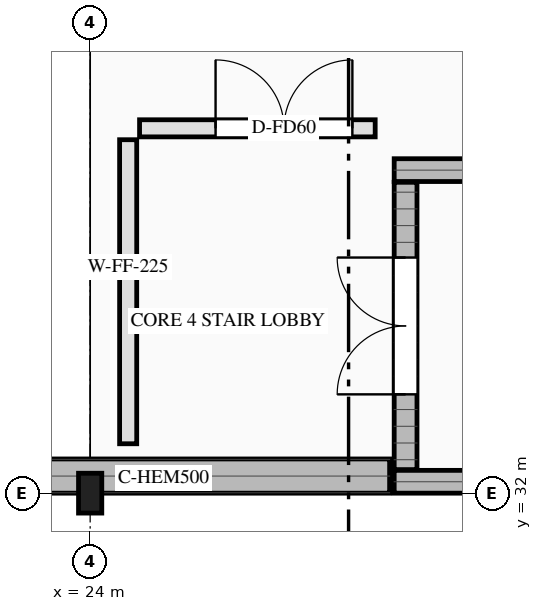
"""IFC4 building model, lengths in metres.
Left out: names, types, materials, properties, quantities, classifications, styles, units other than length and angle.
Written with IfcOpenShell. Run it as: python <this file> out.ifc"""

import sys

from ifc_helpers import new_model, si_unit, direction, frame, frame_2d, origin, origin_2d, place, context, subcontext, project, spatial, rectangle, i_section, extrude, element, fill, save


model = new_model("IFC4")
c1 = context("Model", 3, precision=1e-05, world=origin(), true_north=direction((0.0, 1.0)))
c2 = subcontext(c1, "Body", "Model", "MODEL_VIEW")
j1 = project(units=[si_unit("LENGTHUNIT", "METRE"), si_unit("PLANEANGLEUNIT", "RADIAN")], contexts=[c1])
p1 = place(None, origin())
s1 = spatial("IfcSite", under=j1, at=p1, CompositionType="ELEMENT")
p2 = place(p1, origin())
s2 = spatial("IfcBuilding", under=s1, at=p2, CompositionType="ELEMENT")
p3 = place(p2, frame((0.0, 0.0, -5.4)))
s3 = spatial("IfcBuildingStorey", under=s2, at=p3, CompositionType="ELEMENT", Elevation=-5.4)
p4 = place(p3, frame((16.225, 32.225, -0.4), z_axis=(0.0, 0.0, 1.0), x_axis=(1.0, 0.0, 0.0)))
e1 = element("IfcWall", 1, at=p4, inside=s3, PredefinedType="USERDEFINED", context=c2, shape_type="SweptSolid", body=[
    extrude(rectangle(XDim=11.715, YDim=0.45, at=frame_2d((5.857, 0.0))), origin(), (0.0, 0.0, 1.0), 5.5),
])
for number, where, z_axis, x_axis in (
    (2, (28.0, 32.15, -0.4), (0.0, 0.0, 1.0), (1.0, 0.0, 0.0)),
    (3, (28.0, 36.25, -0.4), (0.0, 0.0, 1.0), (1.0, 0.0, 0.0)),
):
    element("IfcWall", number, at=place(p3, frame(where, z_axis=z_axis, x_axis=x_axis)), inside=s3, PredefinedType="SHEAR", context=c2, shape_type="SweptSolid", body=[
        extrude(rectangle(XDim=10.0, YDim=0.3, at=frame_2d((5.0, 0.0))), origin(), (0.0, 0.0, 1.0), 5.8),
    ])
p5 = place(p3, frame((28.15, 32.31, -0.4), z_axis=(0.0, 0.0, 1.0), x_axis=(0.0, 1.0, 0.0)))
e4 = element("IfcWall", 4, at=p5, inside=s3, PredefinedType="SHEAR", context=c2, shape_type="SweptSolid", body=[
    extrude(rectangle(XDim=3.78, YDim=0.3, at=frame_2d((1.89, 0.0))), origin(), (0.0, 0.0, 1.0), 5.8),
])
p6 = place(p5, frame((0.99, 0.0, 0.4)))
e5 = element("IfcOpeningElement", 5, at=p6, cuts=e4, PredefinedType="OPENING", context=c2, shape_type="SweptSolid", body=[
    extrude(rectangle(XDim=1.8, YDim=2.2, at=frame_2d((0.9, 1.1))), frame((0.0, 0.16, 0.0), z_axis=(0.0, -1.0, 0.0), x_axis=(1.0, 0.0, 0.0)), (0.0, 0.0, 1.0), 0.32),
])
p7 = place(p3, frame((24.0, 32.0, -0.4), z_axis=(0.0, 0.0, 1.0), x_axis=(1.0, 0.0, 0.0)))
e6 = element("IfcColumn", 6, at=p7, inside=s3, PredefinedType="COLUMN", context=c2, shape_type="SweptSolid", body=[
    extrude(i_section(OverallWidth=0.306, OverallDepth=0.524, WebThickness=0.021, FlangeThickness=0.04, FilletRadius=0.027, at=origin_2d()), origin(), (0.0, 0.0, 1.0), 5.8),
])
p8 = place(p3, frame((24.65, 36.8, 0.0), z_axis=(0.0, 0.0, 1.0), x_axis=(1.0, 0.0, 0.0)))
e7 = element("IfcWall", 7, at=p8, inside=s3, PredefinedType="SOLIDWALL", context=c2, shape_type="SweptSolid", body=[
    extrude(rectangle(XDim=3.1, YDim=0.225, at=frame_2d((1.55, 0.0))), origin(), (0.0, 0.0, 1.0), 5.16),
])
p9 = place(p8, frame((1.0, 0.0, 0.0)))
e8 = element("IfcOpeningElement", 8, at=p9, cuts=e7, PredefinedType="OPENING", context=c2, shape_type="SweptSolid", body=[
    extrude(rectangle(XDim=1.8, YDim=2.2, at=frame_2d((0.9, 1.1))), frame((0.0, 0.123, 0.0), z_axis=(0.0, -1.0, 0.0), x_axis=(1.0, 0.0, 0.0)), (0.0, 0.0, 1.0), 0.245),
])
p10 = place(p3, frame((24.5, 32.65, 0.0), z_axis=(0.0, 0.0, 1.0), x_axis=(0.0, 1.0, 0.0)))
e9 = element("IfcWall", 9, at=p10, inside=s3, PredefinedType="SOLIDWALL", context=c2, shape_type="SweptSolid", body=[
    extrude(rectangle(XDim=4.0, YDim=0.225, at=frame_2d((2.0, 0.0))), origin(), (0.0, 0.0, 1.0), 5.16),
])
p11 = place(p6, origin())
e10 = element("IfcDoor", 10, at=p11, inside=s3, OperationType="DOUBLE_DOOR_SINGLE_SWING", PredefinedType="DOOR", context=c2, shape_type="SweptSolid", body=[
    extrude(rectangle(XDim=1.8, YDim=2.2, at=frame_2d((0.9, 1.1))), frame((0.0, 0.025, 0.0), z_axis=(0.0, -1.0, 0.0), x_axis=(1.0, 0.0, 0.0)), (0.0, 0.0, 1.0), 0.05),
])
fill(e5, e10)
p12 = place(p9, origin())
e11 = element("IfcDoor", 11, at=p12, inside=s3, OperationType="DOUBLE_DOOR_SINGLE_SWING", PredefinedType="DOOR", context=c2, shape_type="SweptSolid", body=[
    extrude(rectangle(XDim=1.8, YDim=2.2, at=frame_2d((0.9, 1.1))), frame((0.0, 0.025, 0.0), z_axis=(0.0, -1.0, 0.0), x_axis=(1.0, 0.0, 0.0)), (0.0, 0.0, 1.0), 0.05),
])
fill(e8, e11)
save(model, sys.argv[1])
